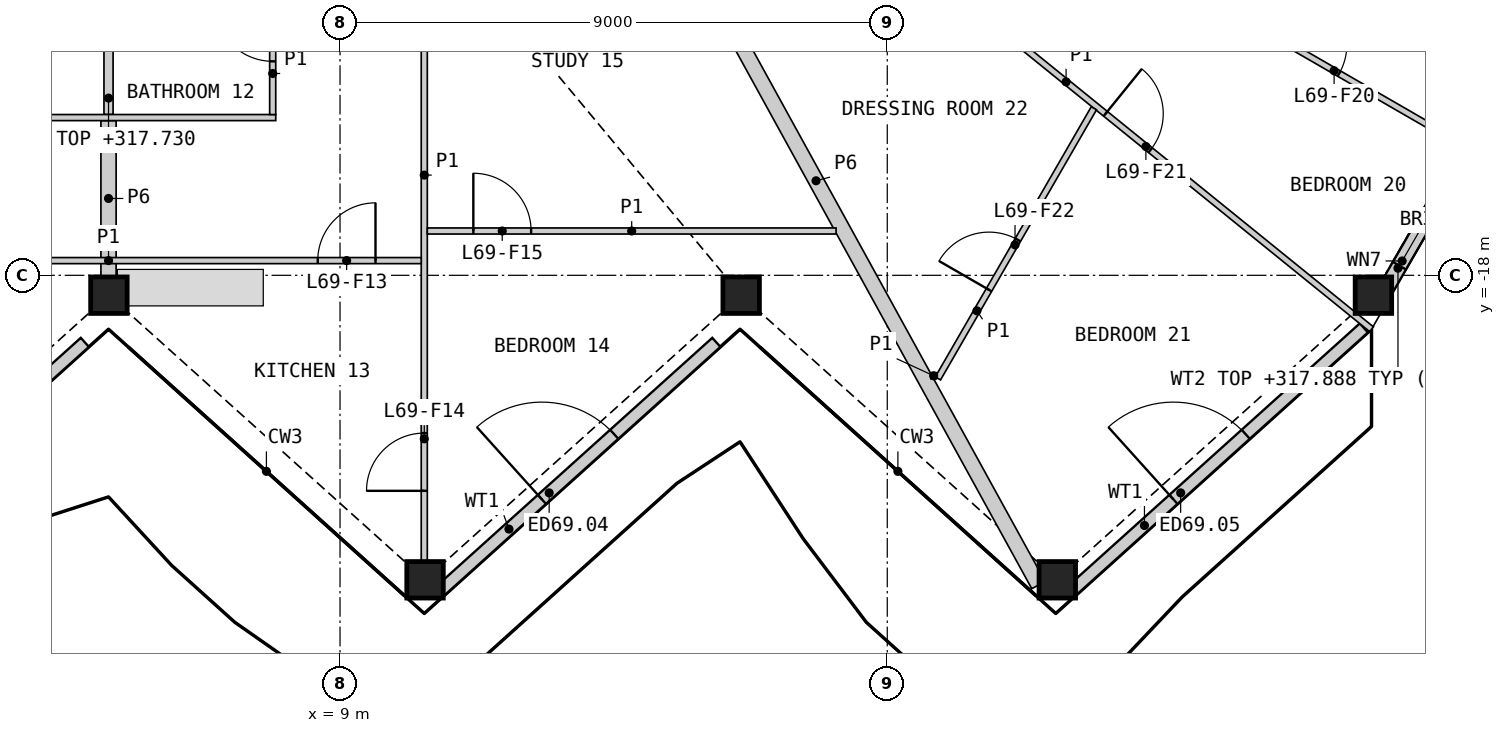
"""IFC4 building model, lengths in metres.
Left out: names, types, materials, properties, quantities, classifications, styles, units other than length and angle.
Written with IfcOpenShell. Run it as: python <this file> out.ifc"""

import sys

from ifc_helpers import new_model, si_unit, direction, frame, frame_2d, origin, origin_2d, place, context, subcontext, project, spatial, rectangle, hollow_rectangle, extrude, element, fill, save


model = new_model("IFC4")
c1 = context("Model", 3, precision=1e-05, world=origin(), true_north=direction((0.0, 1.0)))
c2 = subcontext(c1, "Body", "Model", "MODEL_VIEW")
j1 = project(units=[si_unit("LENGTHUNIT", "METRE"), si_unit("PLANEANGLEUNIT", "RADIAN")], contexts=[c1])
p1 = place(None, origin())
s1 = spatial("IfcSite", under=j1, at=p1, CompositionType="ELEMENT")
p2 = place(p1, origin())
s2 = spatial("IfcBuilding", under=s1, at=p2, CompositionType="ELEMENT")
p3 = place(p2, frame((0.0, 0.0, 315.4)))
s3 = spatial("IfcBuildingStorey", under=s2, at=p3, CompositionType="ELEMENT", Elevation=315.4)
for number, where, z_axis, x_axis in (
    (1, (5.199, -18.327, 0.0), (0.0, 0.0, 1.0), (1.0, 0.0, 0.0)),
    (2, (10.398, -23.008, 0.0), (0.0, 0.0, 1.0), (1.0, 0.0, 0.0)),
    (3, (15.597, -18.327, 0.0), (0.0, 0.0, 1.0), (1.0, 0.0, 0.0)),
    (4, (20.796, -23.008, 0.0), (0.0, 0.0, 1.0), (1.0, 0.0, 0.0)),
    (5, (25.995, -18.327, 0.0), (0.0, 0.0, 1.0), (1.0, 0.0, 0.0)),
):
    element("IfcColumn", number, at=place(p3, frame(where, z_axis=z_axis, x_axis=x_axis)), inside=s3, PredefinedType="COLUMN", context=c2, shape_type="SweptSolid", body=[
        extrude(hollow_rectangle(XDim=0.6, YDim=0.6, WallThickness=0.04, at=origin_2d()), origin(), (0.0, 0.0, 1.0), 3.4),
    ])
p4 = place(p3, frame((0.256, -23.198, 0.0), z_axis=(0.0, 0.0, 1.0), x_axis=(0.743139400616, 0.669136631229, 0.0)))
e6 = element("IfcWall", 6, at=p4, inside=s3, PredefinedType="SOLIDWALL", context=c2, shape_type="SweptSolid", body=[
    extrude(rectangle(XDim=6.12, YDim=0.2, at=frame_2d((3.06, 0.0))), origin(), (0.0, 0.0, 1.0), 2.488),
])
p5 = place(p4, frame((2.26, 0.0, 0.0)))
e7 = element("IfcOpeningElement", 7, at=p5, cuts=e6, PredefinedType="OPENING", context=c2, shape_type="SweptSolid", body=[
    extrude(rectangle(XDim=1.6, YDim=2.25, at=frame_2d((0.8, 1.125))), frame((0.0, 0.11, 0.0), z_axis=(0.0, -1.0, 0.0), x_axis=(1.0, 0.0, 0.0)), (0.0, 0.0, 1.0), 0.22),
])
p6 = place(p3, frame((10.641, -23.198, 0.0), z_axis=(0.0, 0.0, 1.0), x_axis=(0.743121537674, 0.66915646918, 0.0)))
e8 = element("IfcWall", 8, at=p6, inside=s3, PredefinedType="SOLIDWALL", context=c2, shape_type="SweptSolid", body=[
    extrude(rectangle(XDim=6.12, YDim=0.2, at=frame_2d((3.06, 0.0))), origin(), (0.0, 0.0, 1.0), 2.488),
])
p7 = place(p6, frame((2.26, 0.0, 0.0)))
e9 = element("IfcOpeningElement", 9, at=p7, cuts=e8, PredefinedType="OPENING", context=c2, shape_type="SweptSolid", body=[
    extrude(rectangle(XDim=1.6, YDim=2.25, at=frame_2d((0.8, 1.125))), frame((0.0, 0.11, 0.0), z_axis=(0.0, -1.0, 0.0), x_axis=(1.0, 0.0, 0.0)), (0.0, 0.0, 1.0), 0.22),
])
p8 = place(p3, frame((21.027, -23.198, 0.0), z_axis=(0.0, 0.0, 1.0), x_axis=(0.74314788005, 0.669127213897, 0.0)))
e10 = element("IfcWall", 10, at=p8, inside=s3, PredefinedType="SOLIDWALL", context=c2, shape_type="SweptSolid", body=[
    extrude(rectangle(XDim=6.475, YDim=0.2, at=frame_2d((3.237, 0.0))), origin(), (0.0, 0.0, 1.0), 2.488),
])
p9 = place(p8, frame((2.26, 0.0, 0.0)))
e11 = element("IfcOpeningElement", 11, at=p9, cuts=e10, PredefinedType="OPENING", context=c2, shape_type="SweptSolid", body=[
    extrude(rectangle(XDim=1.6, YDim=2.25, at=frame_2d((0.8, 1.125))), frame((0.0, 0.11, 0.0), z_axis=(0.0, -1.0, 0.0), x_axis=(1.0, 0.0, 0.0)), (0.0, 0.0, 1.0), 0.22),
])
p10 = place(p3, frame((26.073, -18.448, 0.0), z_axis=(0.0, 0.0, 1.0), x_axis=(0.499992367345, 0.866029810455, 0.0)))
e12 = element("IfcWall", 12, at=p10, inside=s3, PredefinedType="SOLIDWALL", context=c2, shape_type="SweptSolid", body=[
    extrude(rectangle(XDim=2.61, YDim=0.25, at=frame_2d((1.305, 0.0))), origin(), (0.0, 0.0, 1.0), 2.488),
])
p11 = place(p10, frame((0.7, 0.0, 1.6)))
e13 = element("IfcOpeningElement", 13, at=p11, cuts=e12, PredefinedType="OPENING", context=c2, shape_type="SweptSolid", body=[
    extrude(rectangle(XDim=0.9, YDim=0.6, at=frame_2d((0.45, 0.3))), frame((0.0, 0.135, 0.0), z_axis=(0.0, -1.0, 0.0), x_axis=(1.0, 0.0, 0.0)), (0.0, 0.0, 1.0), 0.27),
])
p12 = place(p3, frame((13.171, -9.796, 0.0), z_axis=(0.0, 0.0, 1.0), x_axis=(0.481999020381, -0.876171755053, 0.0)))
e14 = element("IfcWall", 14, at=p12, inside=s3, PredefinedType="PARTITIONING", context=c2, shape_type="SweptSolid", body=[
    extrude(rectangle(XDim=15.178, YDim=0.25, at=frame_2d((7.589, 0.0))), origin(), (0.0, 0.0, 1.0), 2.33),
])
p13 = place(p3, frame((5.193, -18.017, 0.0), z_axis=(0.0, 0.0, 1.0), x_axis=(0.0, 1.0, 0.0)))
e15 = element("IfcWall", 15, at=p13, inside=s3, PredefinedType="PARTITIONING", context=c2, shape_type="SweptSolid", body=[
    extrude(rectangle(XDim=2.561, YDim=0.25, at=frame_2d((1.281, 0.0))), origin(), (0.0, 0.0, 1.0), 2.33),
])
p14 = place(p3, frame((5.193, -15.356, 0.0), z_axis=(0.0, 0.0, 1.0), x_axis=(0.0, 1.0, 0.0)))
e16 = element("IfcWall", 16, at=p14, inside=s3, PredefinedType="PLUMBINGWALL", context=c2, shape_type="SweptSolid", body=[
    extrude(rectangle(XDim=2.7, YDim=0.15, at=frame_2d((1.35, 0.0))), origin(), (0.0, 0.0, 1.0), 2.33),
])
p15 = place(p3, frame((15.917, -10.751, 0.0), z_axis=(0.0, 0.0, 1.0), x_axis=(0.777149866095, -0.629315569193, 0.0)))
e17 = element("IfcWall", 17, at=p15, inside=s3, PredefinedType="PARTITIONING", context=c2, shape_type="SweptSolid", body=[
    extrude(rectangle(XDim=12.927, YDim=0.1, at=frame_2d((6.464, 0.0))), origin(), (0.0, 0.0, 1.0), 2.33),
])
p16 = place(p15, frame((7.298, 0.0, 0.0)))
e18 = element("IfcOpeningElement", 18, at=p16, cuts=e17, PredefinedType="OPENING", context=c2, shape_type="SweptSolid", body=[
    extrude(rectangle(XDim=0.95, YDim=2.1, at=frame_2d((0.475, 1.05))), frame((0.0, 0.06, 0.0), z_axis=(0.0, -1.0, 0.0), x_axis=(1.0, 0.0, 0.0)), (0.0, 0.0, 1.0), 0.12),
])
p17 = place(p3, frame((10.385, -22.698, 0.0), z_axis=(0.0, 0.0, 1.0), x_axis=(0.0, 1.0, 0.0)))
e19 = element("IfcWall", 19, at=p17, inside=s3, PredefinedType="PARTITIONING", context=c2, shape_type="SweptSolid", body=[
    extrude(rectangle(XDim=12.692, YDim=0.1, at=frame_2d((6.346, 0.0))), origin(), (0.0, 0.0, 1.0), 2.33),
])
p18 = place(p17, frame((1.153, 0.0, 0.0)))
e20 = element("IfcOpeningElement", 20, at=p18, cuts=e19, PredefinedType="OPENING", context=c2, shape_type="SweptSolid", body=[
    extrude(rectangle(XDim=0.95, YDim=2.1, at=frame_2d((0.475, 1.05))), frame((0.0, 0.06, 0.0), z_axis=(0.0, -1.0, 0.0), x_axis=(1.0, 0.0, 0.0)), (0.0, 0.0, 1.0), 0.12),
])
p19 = place(p3, frame((17.365, -10.025, 0.0), z_axis=(0.0, 0.0, 1.0), x_axis=(0.866021046153, -0.500007547564, 0.0)))
e21 = element("IfcWall", 21, at=p19, inside=s3, PredefinedType="PARTITIONING", context=c2, shape_type="SweptSolid", body=[
    extrude(rectangle(XDim=11.267, YDim=0.1, at=frame_2d((5.634, 0.0))), origin(), (0.0, 0.0, 1.0), 2.33),
])
p20 = place(p19, frame((8.364, 0.0, 0.0)))
e22 = element("IfcOpeningElement", 22, at=p20, cuts=e21, PredefinedType="OPENING", context=c2, shape_type="SweptSolid", body=[
    extrude(rectangle(XDim=0.95, YDim=2.1, at=frame_2d((0.475, 1.05))), frame((0.0, 0.06, 0.0), z_axis=(0.0, -1.0, 0.0), x_axis=(1.0, 0.0, 0.0)), (0.0, 0.0, 1.0), 0.12),
])
p21 = place(p3, frame((0.05, -17.758, 0.0), z_axis=(0.0, 0.0, 1.0), x_axis=(1.0, 0.0, 0.0)))
e23 = element("IfcWall", 23, at=p21, inside=s3, PredefinedType="PARTITIONING", context=c2, shape_type="SweptSolid", body=[
    extrude(rectangle(XDim=10.286, YDim=0.1, at=frame_2d((5.143, 0.0))), origin(), (0.0, 0.0, 1.0), 2.33),
])
p22 = place(p21, frame((0.752, 0.0, 0.0)))
e24 = element("IfcOpeningElement", 24, at=p22, cuts=e23, PredefinedType="OPENING", context=c2, shape_type="SweptSolid", body=[
    extrude(rectangle(XDim=0.95, YDim=2.1, at=frame_2d((0.475, 1.05))), frame((0.0, 0.06, 0.0), z_axis=(0.0, -1.0, 0.0), x_axis=(1.0, 0.0, 0.0)), (0.0, 0.0, 1.0), 0.12),
])
p23 = place(p21, frame((8.584, 0.0, 0.0)))
e25 = element("IfcOpeningElement", 25, at=p23, cuts=e23, PredefinedType="OPENING", context=c2, shape_type="SweptSolid", body=[
    extrude(rectangle(XDim=0.95, YDim=2.1, at=frame_2d((0.475, 1.05))), frame((0.0, 0.06, 0.0), z_axis=(0.0, -1.0, 0.0), x_axis=(1.0, 0.0, 0.0)), (0.0, 0.0, 1.0), 0.12),
])
p24 = place(p3, frame((10.436, -17.271, 0.0), z_axis=(0.0, 0.0, 1.0), x_axis=(1.0, 0.0, 0.0)))
e26 = element("IfcWall", 26, at=p24, inside=s3, PredefinedType="PARTITIONING", context=c2, shape_type="SweptSolid", body=[
    extrude(rectangle(XDim=6.722, YDim=0.1, at=frame_2d((3.361, 0.0))), origin(), (0.0, 0.0, 1.0), 2.33),
])
p25 = place(p24, frame((0.757, 0.0, 0.0)))
e27 = element("IfcOpeningElement", 27, at=p25, cuts=e26, PredefinedType="OPENING", context=c2, shape_type="SweptSolid", body=[
    extrude(rectangle(XDim=0.95, YDim=2.1, at=frame_2d((0.475, 1.05))), frame((0.0, 0.06, 0.0), z_axis=(0.0, -1.0, 0.0), x_axis=(1.0, 0.0, 0.0)), (0.0, 0.0, 1.0), 0.12),
])
p26 = place(p3, frame((2.443, -15.406, 0.0), z_axis=(0.0, 0.0, 1.0), x_axis=(1.0, 0.0, 0.0)))
e28 = element("IfcWall", 28, at=p26, inside=s3, PredefinedType="PARTITIONING", context=c2, shape_type="SweptSolid", body=[
    extrude(rectangle(XDim=5.5, YDim=0.1, at=frame_2d((2.75, 0.0))), origin(), (0.0, 0.0, 1.0), 2.33),
])
p27 = place(p3, frame((18.833, -19.695, 0.0), z_axis=(0.0, 0.0, 1.0), x_axis=(0.500034163155, 0.866005678779, 0.0)))
e29 = element("IfcWall", 29, at=p27, inside=s3, PredefinedType="PARTITIONING", context=c2, shape_type="SweptSolid", body=[
    extrude(rectangle(XDim=5.13, YDim=0.1, at=frame_2d((2.565, 0.0))), origin(), (0.0, 0.0, 1.0), 2.33),
])
p28 = place(p27, frame((1.681, 0.0, 0.0)))
e30 = element("IfcOpeningElement", 30, at=p28, cuts=e29, PredefinedType="OPENING", context=c2, shape_type="SweptSolid", body=[
    extrude(rectangle(XDim=0.95, YDim=2.1, at=frame_2d((0.475, 1.05))), frame((0.0, 0.06, 0.0), z_axis=(0.0, -1.0, 0.0), x_axis=(1.0, 0.0, 0.0)), (0.0, 0.0, 1.0), 0.12),
])
p29 = place(p3, frame((7.893, -15.356, 0.0), z_axis=(0.0, 0.0, 1.0), x_axis=(0.0, 1.0, 0.0)))
e31 = element("IfcWall", 31, at=p29, inside=s3, PredefinedType="PARTITIONING", context=c2, shape_type="SweptSolid", body=[
    extrude(rectangle(XDim=2.7, YDim=0.1, at=frame_2d((1.35, 0.0))), origin(), (0.0, 0.0, 1.0), 2.33),
])
p30 = place(p29, frame((0.875, 0.0, 0.0)))
e32 = element("IfcOpeningElement", 32, at=p30, cuts=e31, PredefinedType="OPENING", context=c2, shape_type="SweptSolid", body=[
    extrude(rectangle(XDim=0.95, YDim=2.1, at=frame_2d((0.475, 1.05))), frame((0.0, 0.06, 0.0), z_axis=(0.0, -1.0, 0.0), x_axis=(1.0, 0.0, 0.0)), (0.0, 0.0, 1.0), 0.12),
])
p31 = place(p3, frame((18.718, -19.652, 0.0), z_axis=(0.0, 0.0, 1.0), x_axis=(1.0, 0.0, 0.0)))
e33 = element("IfcWall", 33, at=p31, inside=s3, PredefinedType="PARTITIONING", context=c2, shape_type="SweptSolid", body=[
    extrude(rectangle(XDim=0.09, YDim=0.1, at=frame_2d((0.045, 0.0))), origin(), (0.0, 0.0, 1.0), 2.33),
])
p32 = place(p7, origin())
e34 = element("IfcDoor", 34, at=p32, inside=s3, OperationType="DOUBLE_DOOR_SINGLE_SWING", PredefinedType="DOOR", context=c2, shape_type="SweptSolid", body=[
    extrude(rectangle(XDim=1.6, YDim=2.25, at=frame_2d((0.8, 1.125))), frame((0.0, 0.025, 0.0), z_axis=(0.0, -1.0, 0.0), x_axis=(1.0, 0.0, 0.0)), (0.0, 0.0, 1.0), 0.05),
])
fill(e9, e34)
p33 = place(p9, origin())
e35 = element("IfcDoor", 35, at=p33, inside=s3, OperationType="DOUBLE_DOOR_SINGLE_SWING", PredefinedType="DOOR", context=c2, shape_type="SweptSolid", body=[
    extrude(rectangle(XDim=1.6, YDim=2.25, at=frame_2d((0.8, 1.125))), frame((0.0, 0.025, 0.0), z_axis=(0.0, -1.0, 0.0), x_axis=(1.0, 0.0, 0.0)), (0.0, 0.0, 1.0), 0.05),
])
fill(e11, e35)
p34 = place(p11, origin())
e36 = element("IfcWindow", 36, at=p34, inside=s3, PartitioningType="SINGLE_PANEL", PredefinedType="WINDOW", context=c2, shape_type="SweptSolid", body=[
    extrude(rectangle(XDim=0.9, YDim=0.6, at=frame_2d((0.45, 0.3))), frame((0.0, 0.03, 0.0), z_axis=(0.0, -1.0, 0.0), x_axis=(1.0, 0.0, 0.0)), (0.0, 0.0, 1.0), 0.06),
])
fill(e13, e36)
p35 = place(p30, origin())
e37 = element("IfcDoor", 37, at=p35, inside=s3, OperationType="SINGLE_SWING_RIGHT", PredefinedType="DOOR", context=c2, shape_type="SweptSolid", body=[
    extrude(rectangle(XDim=0.95, YDim=2.1, at=frame_2d((0.475, 1.05))), frame((0.0, 0.025, 0.0), z_axis=(0.0, -1.0, 0.0), x_axis=(1.0, 0.0, 0.0)), (0.0, 0.0, 1.0), 0.05),
])
fill(e32, e37)
p36 = place(p23, origin())
e38 = element("IfcDoor", 38, at=p36, inside=s3, OperationType="SINGLE_SWING_RIGHT", PredefinedType="DOOR", context=c2, shape_type="SweptSolid", body=[
    extrude(rectangle(XDim=0.95, YDim=2.1, at=frame_2d((0.475, 1.05))), frame((0.0, 0.025, 0.0), z_axis=(0.0, -1.0, 0.0), x_axis=(1.0, 0.0, 0.0)), (0.0, 0.0, 1.0), 0.05),
])
fill(e25, e38)
p37 = place(p18, origin())
e39 = element("IfcDoor", 39, at=p37, inside=s3, OperationType="SINGLE_SWING_LEFT", PredefinedType="DOOR", context=c2, shape_type="SweptSolid", body=[
    extrude(rectangle(XDim=0.95, YDim=2.1, at=frame_2d((0.475, 1.05))), frame((0.0, 0.025, 0.0), z_axis=(0.0, -1.0, 0.0), x_axis=(1.0, 0.0, 0.0)), (0.0, 0.0, 1.0), 0.05),
])
fill(e20, e39)
p38 = place(p25, origin())
e40 = element("IfcDoor", 40, at=p38, inside=s3, OperationType="SINGLE_SWING_LEFT", PredefinedType="DOOR", context=c2, shape_type="SweptSolid", body=[
    extrude(rectangle(XDim=0.95, YDim=2.1, at=frame_2d((0.475, 1.05))), frame((0.0, 0.025, 0.0), z_axis=(0.0, -1.0, 0.0), x_axis=(1.0, 0.0, 0.0)), (0.0, 0.0, 1.0), 0.05),
])
fill(e27, e40)
p39 = place(p20, origin())
e41 = element("IfcDoor", 41, at=p39, inside=s3, OperationType="SINGLE_SWING_LEFT", PredefinedType="DOOR", context=c2, shape_type="SweptSolid", body=[
    extrude(rectangle(XDim=0.95, YDim=2.1, at=frame_2d((0.475, 1.05))), frame((0.0, 0.025, 0.0), z_axis=(0.0, -1.0, 0.0), x_axis=(1.0, 0.0, 0.0)), (0.0, 0.0, 1.0), 0.05),
])
fill(e22, e41)
p40 = place(p16, origin())
e42 = element("IfcDoor", 42, at=p40, inside=s3, OperationType="SINGLE_SWING_LEFT", PredefinedType="DOOR", context=c2, shape_type="SweptSolid", body=[
    extrude(rectangle(XDim=0.95, YDim=2.1, at=frame_2d((0.475, 1.05))), frame((0.0, 0.025, 0.0), z_axis=(0.0, -1.0, 0.0), x_axis=(1.0, 0.0, 0.0)), (0.0, 0.0, 1.0), 0.05),
])
fill(e18, e42)
p41 = place(p28, origin())
e43 = element("IfcDoor", 43, at=p41, inside=s3, OperationType="SINGLE_SWING_LEFT", PredefinedType="DOOR", context=c2, shape_type="SweptSolid", body=[
    extrude(rectangle(XDim=0.95, YDim=2.1, at=frame_2d((0.475, 1.05))), frame((0.0, 0.025, 0.0), z_axis=(0.0, -1.0, 0.0), x_axis=(1.0, 0.0, 0.0)), (0.0, 0.0, 1.0), 0.05),
])
fill(e30, e43)
save(model, sys.argv[1])
